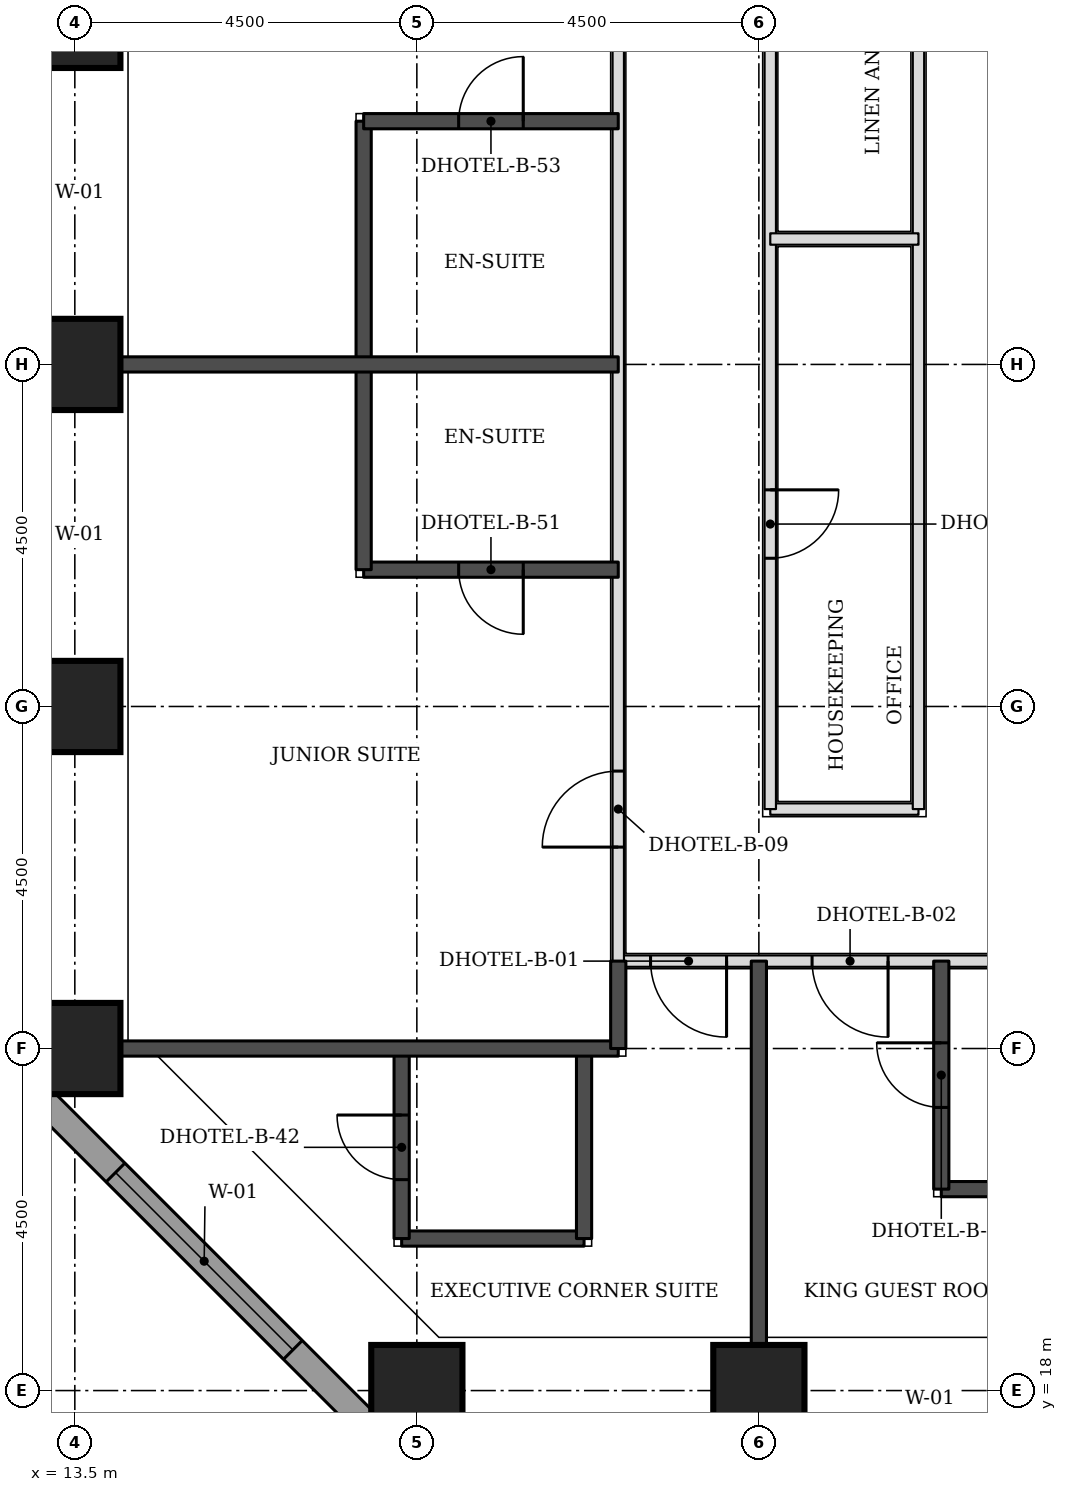
"""IFC4 building model, lengths in metres.
Left out: names, types, materials, properties, quantities, classifications, styles, units other than length and angle.
Written with IfcOpenShell. Run it as: python <this file> out.ifc"""

import sys

from ifc_helpers import new_model, si_unit, direction, frame, frame_2d, origin, origin_2d, place, context, subcontext, project, spatial, rectangle, extrude, element, fill, save


model = new_model("IFC4")
c1 = context("Model", 3, precision=1e-05, world=origin(), true_north=direction((0.0, 1.0)))
c2 = subcontext(c1, "Body", "Model", "MODEL_VIEW")
j1 = project(units=[si_unit("LENGTHUNIT", "METRE"), si_unit("PLANEANGLEUNIT", "RADIAN")], contexts=[c1])
p1 = place(None, origin())
s1 = spatial("IfcSite", under=j1, at=p1, CompositionType="ELEMENT")
p2 = place(p1, origin())
s2 = spatial("IfcBuilding", under=s1, at=p2, CompositionType="ELEMENT")
p3 = place(p2, frame((0.0, 0.0, 52.8)))
s3 = spatial("IfcBuildingStorey", under=s2, at=p3, CompositionType="ELEMENT", Elevation=52.8)
for number, where, z_axis, x_axis in (
    (1, (18.0, 18.0, 0.0), (0.0, 0.0, 1.0), (1.0, 0.0, 0.0)),
    (2, (22.5, 18.0, 0.0), (0.0, 0.0, 1.0), (1.0, 0.0, 0.0)),
    (3, (13.5, 22.5, 0.0), (0.0, 0.0, 1.0), (1.0, 0.0, 0.0)),
    (4, (13.5, 27.0, 0.0), (0.0, 0.0, 1.0), (1.0, 0.0, 0.0)),
    (5, (13.5, 31.5, 0.0), (0.0, 0.0, 1.0), (1.0, 0.0, 0.0)),
    (6, (13.5, 36.0, 0.0), (0.0, 0.0, 1.0), (1.0, 0.0, 0.0)),
):
    element("IfcColumn", number, at=place(p3, frame(where, z_axis=z_axis, x_axis=x_axis)), inside=s3, PredefinedType="COLUMN", context=c2, shape_type="SweptSolid", body=[
        extrude(rectangle(XDim=1.2, YDim=1.2, at=origin_2d()), origin(), (0.0, 0.0, 1.0), 3.3),
    ])
p4 = place(p3, frame((12.674, 22.23, 0.0), z_axis=(0.0, 0.0, 1.0), x_axis=(0.707106781187, -0.707106781187, 0.0)))
e7 = element("IfcWall", 7, at=p4, inside=s3, PredefinedType="STANDARD", context=c2, shape_type="SweptSolid", body=[
    extrude(rectangle(XDim=7.151, YDim=0.35, at=frame_2d((3.576, 0.0))), origin(), (0.0, 0.0, 1.0), 3.055),
])
p5 = place(p4, frame((1.926, 0.0, 0.8)))
e8 = element("IfcOpeningElement", 8, at=p5, cuts=e7, PredefinedType="OPENING", context=c2, shape_type="SweptSolid", body=[
    extrude(rectangle(XDim=3.3, YDim=1.5, at=frame_2d((1.65, 0.75))), frame((0.0, 0.185, 0.0), z_axis=(0.0, -1.0, 0.0), x_axis=(1.0, 0.0, 0.0)), (0.0, 0.0, 1.0), 0.37),
])
p6 = place(p3, frame((20.65, 23.65, 0.0), z_axis=(0.0, 0.0, 1.0), x_axis=(1.0, 0.0, 0.0)))
e9 = element("IfcWall", 9, at=p6, inside=s3, PredefinedType="PARTITIONING", context=c2, shape_type="SweptSolid", body=[
    extrude(rectangle(XDim=32.2, YDim=0.15, at=frame_2d((16.1, 0.0))), origin(), (0.0, 0.0, 1.0), 3.08),
])
p7 = place(p6, frame((2.55, 0.0, 0.0)))
e10 = element("IfcOpeningElement", 10, at=p7, cuts=e9, PredefinedType="OPENING", context=c2, shape_type="SweptSolid", body=[
    extrude(rectangle(XDim=1.0, YDim=2.1, at=frame_2d((0.5, 1.05))), frame((0.0, 0.085, 0.0), z_axis=(0.0, -1.0, 0.0), x_axis=(1.0, 0.0, 0.0)), (0.0, 0.0, 1.0), 0.17),
])
p8 = place(p6, frame((9.4, 0.0, 0.0)))
e11 = element("IfcOpeningElement", 11, at=p8, cuts=e9, PredefinedType="OPENING", context=c2, shape_type="SweptSolid", body=[
    extrude(rectangle(XDim=1.0, YDim=2.1, at=frame_2d((0.5, 1.05))), frame((0.0, 0.085, 0.0), z_axis=(0.0, -1.0, 0.0), x_axis=(1.0, 0.0, 0.0)), (0.0, 0.0, 1.0), 0.17),
])
p9 = place(p6, frame((11.55, 0.0, 0.0)))
e12 = element("IfcOpeningElement", 12, at=p9, cuts=e9, PredefinedType="OPENING", context=c2, shape_type="SweptSolid", body=[
    extrude(rectangle(XDim=1.0, YDim=2.1, at=frame_2d((0.5, 1.05))), frame((0.0, 0.085, 0.0), z_axis=(0.0, -1.0, 0.0), x_axis=(1.0, 0.0, 0.0)), (0.0, 0.0, 1.0), 0.17),
])
p10 = place(p6, frame((18.4, 0.0, 0.0)))
e13 = element("IfcOpeningElement", 13, at=p10, cuts=e9, PredefinedType="OPENING", context=c2, shape_type="SweptSolid", body=[
    extrude(rectangle(XDim=1.0, YDim=2.1, at=frame_2d((0.5, 1.05))), frame((0.0, 0.085, 0.0), z_axis=(0.0, -1.0, 0.0), x_axis=(1.0, 0.0, 0.0)), (0.0, 0.0, 1.0), 0.17),
])
p11 = place(p6, frame((20.55, 0.0, 0.0)))
e14 = element("IfcOpeningElement", 14, at=p11, cuts=e9, PredefinedType="OPENING", context=c2, shape_type="SweptSolid", body=[
    extrude(rectangle(XDim=1.0, YDim=2.1, at=frame_2d((0.5, 1.05))), frame((0.0, 0.085, 0.0), z_axis=(0.0, -1.0, 0.0), x_axis=(1.0, 0.0, 0.0)), (0.0, 0.0, 1.0), 0.17),
])
p12 = place(p6, frame((27.4, 0.0, 0.0)))
e15 = element("IfcOpeningElement", 15, at=p12, cuts=e9, PredefinedType="OPENING", context=c2, shape_type="SweptSolid", body=[
    extrude(rectangle(XDim=1.0, YDim=2.1, at=frame_2d((0.5, 1.05))), frame((0.0, 0.085, 0.0), z_axis=(0.0, -1.0, 0.0), x_axis=(1.0, 0.0, 0.0)), (0.0, 0.0, 1.0), 0.17),
])
p13 = place(p6, frame((0.425, 0.0, 0.0)))
e16 = element("IfcOpeningElement", 16, at=p13, cuts=e9, PredefinedType="OPENING", context=c2, shape_type="SweptSolid", body=[
    extrude(rectangle(XDim=1.0, YDim=2.1, at=frame_2d((0.5, 1.05))), frame((0.0, 0.085, 0.0), z_axis=(0.0, -1.0, 0.0), x_axis=(1.0, 0.0, 0.0)), (0.0, 0.0, 1.0), 0.17),
])
p14 = place(p6, frame((30.025, 0.0, 0.0)))
e17 = element("IfcOpeningElement", 17, at=p14, cuts=e9, PredefinedType="OPENING", context=c2, shape_type="SweptSolid", body=[
    extrude(rectangle(XDim=1.0, YDim=2.1, at=frame_2d((0.5, 1.05))), frame((0.0, 0.085, 0.0), z_axis=(0.0, -1.0, 0.0), x_axis=(1.0, 0.0, 0.0)), (0.0, 0.0, 1.0), 0.17),
])
p15 = place(p3, frame((20.65, 23.65, 0.0), z_axis=(0.0, 0.0, 1.0), x_axis=(0.0, 1.0, 0.0)))
e18 = element("IfcWall", 18, at=p15, inside=s3, PredefinedType="PARTITIONING", context=c2, shape_type="SweptSolid", body=[
    extrude(rectangle(XDim=25.85, YDim=0.15, at=frame_2d((12.925, 0.0))), origin(), (0.0, 0.0, 1.0), 3.08),
])
p16 = place(p15, frame((1.5, 0.0, 0.0)))
e19 = element("IfcOpeningElement", 19, at=p16, cuts=e18, PredefinedType="OPENING", context=c2, shape_type="SweptSolid", body=[
    extrude(rectangle(XDim=1.0, YDim=2.1, at=frame_2d((0.5, 1.05))), frame((0.0, 0.085, 0.0), z_axis=(0.0, -1.0, 0.0), x_axis=(1.0, 0.0, 0.0)), (0.0, 0.0, 1.0), 0.17),
])
p17 = place(p15, frame((13.45, 0.0, 0.0)))
e20 = element("IfcOpeningElement", 20, at=p17, cuts=e18, PredefinedType="OPENING", context=c2, shape_type="SweptSolid", body=[
    extrude(rectangle(XDim=1.0, YDim=2.1, at=frame_2d((0.5, 1.05))), frame((0.0, 0.085, 0.0), z_axis=(0.0, -1.0, 0.0), x_axis=(1.0, 0.0, 0.0)), (0.0, 0.0, 1.0), 0.17),
])
p18 = place(p15, frame((19.5, 0.0, 0.0)))
e21 = element("IfcOpeningElement", 21, at=p18, cuts=e18, PredefinedType="OPENING", context=c2, shape_type="SweptSolid", body=[
    extrude(rectangle(XDim=1.0, YDim=2.1, at=frame_2d((0.5, 1.05))), frame((0.0, 0.085, 0.0), z_axis=(0.0, -1.0, 0.0), x_axis=(1.0, 0.0, 0.0)), (0.0, 0.0, 1.0), 0.17),
])
p19 = place(p3, frame((22.65, 25.65, 0.0), z_axis=(0.0, 0.0, 1.0), x_axis=(1.0, 0.0, 0.0)))
e22 = element("IfcWall", 22, at=p19, inside=s3, PredefinedType="PARTITIONING", context=c2, shape_type="SweptSolid", body=[
    extrude(rectangle(XDim=1.95, YDim=0.15, at=frame_2d((0.975, 0.0))), origin(), (0.0, 0.0, 1.0), 3.08),
])
p20 = place(p3, frame((22.65, 25.65, 0.0), z_axis=(0.0, 0.0, 1.0), x_axis=(0.0, 1.0, 0.0)))
e23 = element("IfcWall", 23, at=p20, inside=s3, PredefinedType="PARTITIONING", context=c2, shape_type="SweptSolid", body=[
    extrude(rectangle(XDim=17.35, YDim=0.15, at=frame_2d((8.675, 0.0))), origin(), (0.0, 0.0, 1.0), 3.08),
])
p21 = place(p20, frame((3.3, 0.0, 0.0)))
e24 = element("IfcOpeningElement", 24, at=p21, cuts=e23, PredefinedType="OPENING", context=c2, shape_type="SweptSolid", body=[
    extrude(rectangle(XDim=0.9, YDim=2.1, at=frame_2d((0.45, 1.05))), frame((0.0, 0.085, 0.0), z_axis=(0.0, -1.0, 0.0), x_axis=(1.0, 0.0, 0.0)), (0.0, 0.0, 1.0), 0.17),
])
p22 = place(p20, frame((10.725, 0.0, 0.0)))
e25 = element("IfcOpeningElement", 25, at=p22, cuts=e23, PredefinedType="OPENING", context=c2, shape_type="SweptSolid", body=[
    extrude(rectangle(XDim=0.9, YDim=2.1, at=frame_2d((0.45, 1.05))), frame((0.0, 0.085, 0.0), z_axis=(0.0, -1.0, 0.0), x_axis=(1.0, 0.0, 0.0)), (0.0, 0.0, 1.0), 0.17),
])
p23 = place(p3, frame((24.6, 25.65, 0.0), z_axis=(0.0, 0.0, 1.0), x_axis=(0.0, 1.0, 0.0)))
e26 = element("IfcWall", 26, at=p23, inside=s3, PredefinedType="PARTITIONING", context=c2, shape_type="SweptSolid", body=[
    extrude(rectangle(XDim=14.85, YDim=0.15, at=frame_2d((7.425, 0.0))), origin(), (0.0, 0.0, 1.0), 3.08),
])
p24 = place(p3, frame((22.5, 18.6, 0.0), z_axis=(0.0, 0.0, 1.0), x_axis=(0.0, 1.0, 0.0)))
e27 = element("IfcWall", 27, at=p24, inside=s3, PredefinedType="SOLIDWALL", context=c2, shape_type="SweptSolid", body=[
    extrude(rectangle(XDim=5.05, YDim=0.2, at=frame_2d((2.525, 0.0))), origin(), (0.0, 0.0, 1.0), 3.08),
])
p25 = place(p3, frame((17.8, 20.0, 0.0), z_axis=(0.0, 0.0, 1.0), x_axis=(1.0, 0.0, 0.0)))
e28 = element("IfcWall", 28, at=p25, inside=s3, PredefinedType="SOLIDWALL", context=c2, shape_type="SweptSolid", body=[
    extrude(rectangle(XDim=2.4, YDim=0.2, at=frame_2d((1.2, 0.0))), origin(), (0.0, 0.0, 1.0), 3.08),
])
p26 = place(p3, frame((17.8, 20.0, 0.0), z_axis=(0.0, 0.0, 1.0), x_axis=(0.0, 1.0, 0.0)))
e29 = element("IfcWall", 29, at=p26, inside=s3, PredefinedType="SOLIDWALL", context=c2, shape_type="SweptSolid", body=[
    extrude(rectangle(XDim=2.5, YDim=0.2, at=frame_2d((1.25, 0.0))), origin(), (0.0, 0.0, 1.0), 3.08),
])
p27 = place(p26, frame((0.775, 0.0, 0.0)))
e30 = element("IfcOpeningElement", 30, at=p27, cuts=e29, PredefinedType="OPENING", context=c2, shape_type="SweptSolid", body=[
    extrude(rectangle(XDim=0.85, YDim=2.1, at=frame_2d((0.425, 1.05))), frame((0.0, 0.11, 0.0), z_axis=(0.0, -1.0, 0.0), x_axis=(1.0, 0.0, 0.0)), (0.0, 0.0, 1.0), 0.22),
])
p28 = place(p3, frame((20.2, 20.0, 0.0), z_axis=(0.0, 0.0, 1.0), x_axis=(0.0, 1.0, 0.0)))
e31 = element("IfcWall", 31, at=p28, inside=s3, PredefinedType="SOLIDWALL", context=c2, shape_type="SweptSolid", body=[
    extrude(rectangle(XDim=2.5, YDim=0.2, at=frame_2d((1.25, 0.0))), origin(), (0.0, 0.0, 1.0), 3.08),
])
p29 = place(p3, frame((24.9, 20.65, 0.0), z_axis=(0.0, 0.0, 1.0), x_axis=(1.0, 0.0, 0.0)))
e32 = element("IfcWall", 32, at=p29, inside=s3, PredefinedType="SOLIDWALL", context=c2, shape_type="SweptSolid", body=[
    extrude(rectangle(XDim=4.7, YDim=0.2, at=frame_2d((2.35, 0.0))), origin(), (0.0, 0.0, 1.0), 3.08),
])
p30 = place(p3, frame((24.9, 20.65, 0.0), z_axis=(0.0, 0.0, 1.0), x_axis=(0.0, 1.0, 0.0)))
e33 = element("IfcWall", 33, at=p30, inside=s3, PredefinedType="SOLIDWALL", context=c2, shape_type="SweptSolid", body=[
    extrude(rectangle(XDim=3.0, YDim=0.2, at=frame_2d((1.5, 0.0))), origin(), (0.0, 0.0, 1.0), 3.08),
])
p31 = place(p30, frame((1.075, 0.0, 0.0)))
e34 = element("IfcOpeningElement", 34, at=p31, cuts=e33, PredefinedType="OPENING", context=c2, shape_type="SweptSolid", body=[
    extrude(rectangle(XDim=0.85, YDim=2.1, at=frame_2d((0.425, 1.05))), frame((0.0, 0.11, 0.0), z_axis=(0.0, -1.0, 0.0), x_axis=(1.0, 0.0, 0.0)), (0.0, 0.0, 1.0), 0.22),
])
p32 = place(p3, frame((14.1, 22.5, 0.0), z_axis=(0.0, 0.0, 1.0), x_axis=(1.0, 0.0, 0.0)))
e35 = element("IfcWall", 35, at=p32, inside=s3, PredefinedType="SOLIDWALL", context=c2, shape_type="SweptSolid", body=[
    extrude(rectangle(XDim=6.55, YDim=0.2, at=frame_2d((3.275, 0.0))), origin(), (0.0, 0.0, 1.0), 3.08),
])
p33 = place(p3, frame((20.65, 22.5, 0.0), z_axis=(0.0, 0.0, 1.0), x_axis=(0.0, 1.0, 0.0)))
e36 = element("IfcWall", 36, at=p33, inside=s3, PredefinedType="SOLIDWALL", context=c2, shape_type="SweptSolid", body=[
    extrude(rectangle(XDim=1.15, YDim=0.2, at=frame_2d((0.575, 0.0))), origin(), (0.0, 0.0, 1.0), 3.08),
])
p34 = place(p3, frame((17.3, 28.8, 0.0), z_axis=(0.0, 0.0, 1.0), x_axis=(1.0, 0.0, 0.0)))
e37 = element("IfcWall", 37, at=p34, inside=s3, PredefinedType="SOLIDWALL", context=c2, shape_type="SweptSolid", body=[
    extrude(rectangle(XDim=3.35, YDim=0.2, at=frame_2d((1.675, 0.0))), origin(), (0.0, 0.0, 1.0), 3.08),
])
p35 = place(p34, frame((1.25, 0.0, 0.0)))
e38 = element("IfcOpeningElement", 38, at=p35, cuts=e37, PredefinedType="OPENING", context=c2, shape_type="SweptSolid", body=[
    extrude(rectangle(XDim=0.85, YDim=2.1, at=frame_2d((0.425, 1.05))), frame((0.0, 0.11, 0.0), z_axis=(0.0, -1.0, 0.0), x_axis=(1.0, 0.0, 0.0)), (0.0, 0.0, 1.0), 0.22),
])
p36 = place(p3, frame((17.3, 28.8, 0.0), z_axis=(0.0, 0.0, 1.0), x_axis=(0.0, 1.0, 0.0)))
e39 = element("IfcWall", 39, at=p36, inside=s3, PredefinedType="SOLIDWALL", context=c2, shape_type="SweptSolid", body=[
    extrude(rectangle(XDim=5.9, YDim=0.2, at=frame_2d((2.95, 0.0))), origin(), (0.0, 0.0, 1.0), 3.08),
])
p37 = place(p3, frame((14.1, 31.5, 0.0), z_axis=(0.0, 0.0, 1.0), x_axis=(1.0, 0.0, 0.0)))
e40 = element("IfcWall", 40, at=p37, inside=s3, PredefinedType="SOLIDWALL", context=c2, shape_type="SweptSolid", body=[
    extrude(rectangle(XDim=6.55, YDim=0.2, at=frame_2d((3.275, 0.0))), origin(), (0.0, 0.0, 1.0), 3.08),
])
p38 = place(p3, frame((17.3, 34.7, 0.0), z_axis=(0.0, 0.0, 1.0), x_axis=(1.0, 0.0, 0.0)))
e41 = element("IfcWall", 41, at=p38, inside=s3, PredefinedType="SOLIDWALL", context=c2, shape_type="SweptSolid", body=[
    extrude(rectangle(XDim=3.35, YDim=0.2, at=frame_2d((1.675, 0.0))), origin(), (0.0, 0.0, 1.0), 3.08),
])
p39 = place(p38, frame((1.25, 0.0, 0.0)))
e42 = element("IfcOpeningElement", 42, at=p39, cuts=e41, PredefinedType="OPENING", context=c2, shape_type="SweptSolid", body=[
    extrude(rectangle(XDim=0.85, YDim=2.1, at=frame_2d((0.425, 1.05))), frame((0.0, 0.11, 0.0), z_axis=(0.0, -1.0, 0.0), x_axis=(1.0, 0.0, 0.0)), (0.0, 0.0, 1.0), 0.22),
])
p40 = place(p3, frame((22.65, 33.15, 0.0), z_axis=(0.0, 0.0, 1.0), x_axis=(1.0, 0.0, 0.0)))
e43 = element("IfcWall", 43, at=p40, inside=s3, PredefinedType="PARTITIONING", context=c2, shape_type="SweptSolid", body=[
    extrude(rectangle(XDim=1.95, YDim=0.15, at=frame_2d((0.975, 0.0))), origin(), (0.0, 0.0, 1.0), 3.08),
])
p41 = place(p5, origin())
e44 = element("IfcWindow", 44, at=p41, inside=s3, PartitioningType="SINGLE_PANEL", PredefinedType="WINDOW", context=c2, shape_type="SweptSolid", body=[
    extrude(rectangle(XDim=3.3, YDim=1.5, at=frame_2d((1.65, 0.75))), frame((0.0, 0.085, 0.0), z_axis=(0.0, -1.0, 0.0), x_axis=(1.0, 0.0, 0.0)), (0.0, 0.0, 1.0), 0.06),
])
fill(e8, e44)
p42 = place(p7, frame((1.0, 0.0, 0.0), z_axis=(0.0, 0.0, 1.0), x_axis=(-1.0, 0.0, 0.0)))
e45 = element("IfcDoor", 45, at=p42, inside=s3, OperationType="SINGLE_SWING_LEFT", PredefinedType="DOOR", context=c2, shape_type="SweptSolid", body=[
    extrude(rectangle(XDim=1.0, YDim=2.1, at=frame_2d((0.5, 1.05))), frame((0.0, 0.025, 0.0), z_axis=(0.0, -1.0, 0.0), x_axis=(1.0, 0.0, 0.0)), (0.0, 0.0, 1.0), 0.05),
])
fill(e10, e45)
p43 = place(p31, origin())
e46 = element("IfcDoor", 46, at=p43, inside=s3, OperationType="SINGLE_SWING_RIGHT", PredefinedType="DOOR", context=c2, shape_type="SweptSolid", body=[
    extrude(rectangle(XDim=0.85, YDim=2.1, at=frame_2d((0.425, 1.05))), frame((0.0, 0.025, 0.0), z_axis=(0.0, -1.0, 0.0), x_axis=(1.0, 0.0, 0.0)), (0.0, 0.0, 1.0), 0.05),
])
fill(e34, e46)
p44 = place(p16, origin())
e47 = element("IfcDoor", 47, at=p44, inside=s3, OperationType="SINGLE_SWING_LEFT", PredefinedType="DOOR", context=c2, shape_type="SweptSolid", body=[
    extrude(rectangle(XDim=1.0, YDim=2.1, at=frame_2d((0.5, 1.05))), frame((0.0, 0.025, 0.0), z_axis=(0.0, -1.0, 0.0), x_axis=(1.0, 0.0, 0.0)), (0.0, 0.0, 1.0), 0.05),
])
fill(e19, e47)
p45 = place(p35, frame((0.85, 0.0, 0.0), z_axis=(0.0, 0.0, 1.0), x_axis=(-1.0, 0.0, 0.0)))
e48 = element("IfcDoor", 48, at=p45, inside=s3, OperationType="SINGLE_SWING_LEFT", PredefinedType="DOOR", context=c2, shape_type="SweptSolid", body=[
    extrude(rectangle(XDim=0.85, YDim=2.1, at=frame_2d((0.425, 1.05))), frame((0.0, 0.025, 0.0), z_axis=(0.0, -1.0, 0.0), x_axis=(1.0, 0.0, 0.0)), (0.0, 0.0, 1.0), 0.05),
])
fill(e38, e48)
p46 = place(p39, origin())
e49 = element("IfcDoor", 49, at=p46, inside=s3, OperationType="SINGLE_SWING_RIGHT", PredefinedType="DOOR", context=c2, shape_type="SweptSolid", body=[
    extrude(rectangle(XDim=0.85, YDim=2.1, at=frame_2d((0.425, 1.05))), frame((0.0, 0.025, 0.0), z_axis=(0.0, -1.0, 0.0), x_axis=(1.0, 0.0, 0.0)), (0.0, 0.0, 1.0), 0.05),
])
fill(e42, e49)
p47 = place(p13, frame((1.0, 0.0, 0.0), z_axis=(0.0, 0.0, 1.0), x_axis=(-1.0, 0.0, 0.0)))
e50 = element("IfcDoor", 50, at=p47, inside=s3, OperationType="SINGLE_SWING_LEFT", PredefinedType="DOOR", context=c2, shape_type="SweptSolid", body=[
    extrude(rectangle(XDim=1.0, YDim=2.1, at=frame_2d((0.5, 1.05))), frame((0.0, 0.025, 0.0), z_axis=(0.0, -1.0, 0.0), x_axis=(1.0, 0.0, 0.0)), (0.0, 0.0, 1.0), 0.05),
])
fill(e16, e50)
p48 = place(p27, origin())
e51 = element("IfcDoor", 51, at=p48, inside=s3, OperationType="SINGLE_SWING_RIGHT", PredefinedType="DOOR", context=c2, shape_type="SweptSolid", body=[
    extrude(rectangle(XDim=0.85, YDim=2.1, at=frame_2d((0.425, 1.05))), frame((0.0, 0.025, 0.0), z_axis=(0.0, -1.0, 0.0), x_axis=(1.0, 0.0, 0.0)), (0.0, 0.0, 1.0), 0.05),
])
fill(e30, e51)
p49 = place(p21, frame((0.9, 0.0, 0.0), z_axis=(0.0, 0.0, 1.0), x_axis=(-1.0, 0.0, 0.0)))
e52 = element("IfcDoor", 52, at=p49, inside=s3, OperationType="SINGLE_SWING_LEFT", PredefinedType="DOOR", context=c2, shape_type="SweptSolid", body=[
    extrude(rectangle(XDim=0.9, YDim=2.1, at=frame_2d((0.45, 1.05))), frame((0.0, 0.025, 0.0), z_axis=(0.0, -1.0, 0.0), x_axis=(1.0, 0.0, 0.0)), (0.0, 0.0, 1.0), 0.05),
])
fill(e24, e52)
save(model, sys.argv[1])
